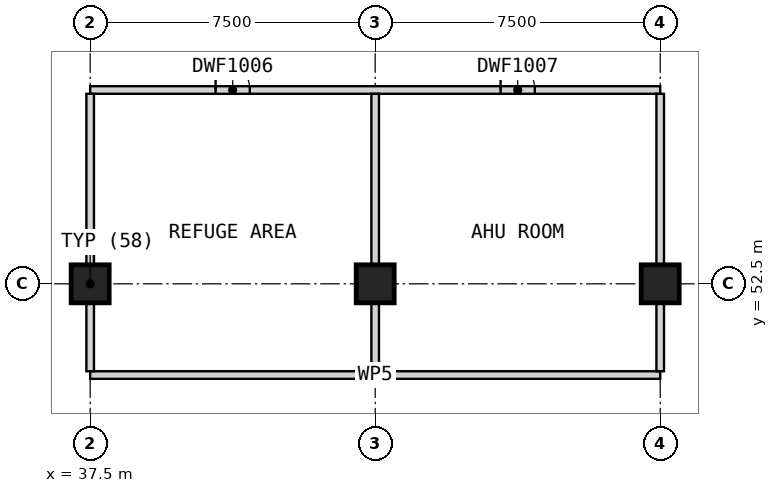
"""IFC4 building model, lengths in metres.
Left out: names, types, materials, properties, quantities, classifications, styles, units other than length and angle.
Written with IfcOpenShell. Run it as: python <this file> out.ifc"""

import sys

from ifc_helpers import new_model, si_unit, direction, frame, frame_2d, origin, origin_2d, place, context, subcontext, project, spatial, rectangle, extrude, element, fill, save


model = new_model("IFC4")
c1 = context("Model", 3, precision=1e-05, world=origin(), true_north=direction((0.0, 1.0)))
c2 = subcontext(c1, "Body", "Model", "MODEL_VIEW")
j1 = project(units=[si_unit("LENGTHUNIT", "METRE"), si_unit("PLANEANGLEUNIT", "RADIAN")], contexts=[c1])
p1 = place(None, origin())
s1 = spatial("IfcSite", under=j1, at=p1, CompositionType="ELEMENT")
p2 = place(p1, origin())
s2 = spatial("IfcBuilding", under=s1, at=p2, CompositionType="ELEMENT")
p3 = place(p2, frame((0.0, 0.0, 166.2)))
s3 = spatial("IfcBuildingStorey", under=s2, at=p3, CompositionType="ELEMENT", Elevation=166.2)
for number, where, z_axis, x_axis in (
    (1, (37.5, 52.5, 0.0), (0.0, 0.0, 1.0), (1.0, 0.0, 0.0)),
    (2, (45.0, 52.5, 0.0), (0.0, 0.0, 1.0), (1.0, 0.0, 0.0)),
    (3, (52.5, 52.5, 0.0), (0.0, 0.0, 1.0), (1.0, 0.0, 0.0)),
):
    element("IfcColumn", number, at=place(p3, frame(where, z_axis=z_axis, x_axis=x_axis)), inside=s3, PredefinedType="COLUMN", context=c2, shape_type="SweptSolid", body=[
        extrude(rectangle(XDim=1.0, YDim=1.0, at=origin_2d()), origin(), (0.0, 0.0, 1.0), 8.0),
    ])
p4 = place(p3, frame((37.5, 50.1, 0.0), z_axis=(0.0, 0.0, 1.0), x_axis=(1.0, 0.0, 0.0)))
e4 = element("IfcWall", 4, at=p4, inside=s3, PredefinedType="PARTITIONING", context=c2, shape_type="SweptSolid", body=[
    extrude(rectangle(XDim=15.0, YDim=0.2, at=frame_2d((7.5, 0.0))), origin(), (0.0, 0.0, 1.0), 7.7),
])
p5 = place(p3, frame((37.5, 57.6, 0.0), z_axis=(0.0, 0.0, 1.0), x_axis=(1.0, 0.0, 0.0)))
e5 = element("IfcWall", 5, at=p5, inside=s3, PredefinedType="PARTITIONING", context=c2, shape_type="SweptSolid", body=[
    extrude(rectangle(XDim=15.0, YDim=0.2, at=frame_2d((7.5, 0.0))), origin(), (0.0, 0.0, 1.0), 7.7),
])
p6 = place(p5, frame((3.3, 0.0, 0.0)))
e6 = element("IfcOpeningElement", 6, at=p6, cuts=e5, PredefinedType="OPENING", context=c2, shape_type="SweptSolid", body=[
    extrude(rectangle(XDim=0.9, YDim=2.1, at=frame_2d((0.45, 1.05))), frame((0.0, 0.11, 0.0), z_axis=(0.0, -1.0, 0.0), x_axis=(1.0, 0.0, 0.0)), (0.0, 0.0, 1.0), 0.22),
])
p7 = place(p5, frame((10.8, 0.0, 0.0)))
e7 = element("IfcOpeningElement", 7, at=p7, cuts=e5, PredefinedType="OPENING", context=c2, shape_type="SweptSolid", body=[
    extrude(rectangle(XDim=0.9, YDim=2.1, at=frame_2d((0.45, 1.05))), frame((0.0, 0.11, 0.0), z_axis=(0.0, -1.0, 0.0), x_axis=(1.0, 0.0, 0.0)), (0.0, 0.0, 1.0), 0.22),
])
p8 = place(p3, frame((37.5, 50.2, 0.0), z_axis=(0.0, 0.0, 1.0), x_axis=(0.0, 1.0, 0.0)))
e8 = element("IfcWall", 8, at=p8, inside=s3, PredefinedType="PARTITIONING", context=c2, shape_type="SweptSolid", body=[
    extrude(rectangle(XDim=7.3, YDim=0.2, at=frame_2d((3.65, 0.0))), origin(), (0.0, 0.0, 1.0), 6.0),
])
for number, where, z_axis, x_axis in (
    (9, (45.0, 50.2, 0.0), (0.0, 0.0, 1.0), (0.0, 1.0, 0.0)),
    (10, (52.5, 50.2, 0.0), (0.0, 0.0, 1.0), (0.0, 1.0, 0.0)),
):
    element("IfcWall", number, at=place(p3, frame(where, z_axis=z_axis, x_axis=x_axis)), inside=s3, PredefinedType="PARTITIONING", context=c2, shape_type="SweptSolid", body=[
        extrude(rectangle(XDim=7.3, YDim=0.2, at=frame_2d((3.65, 0.0))), origin(), (0.0, 0.0, 1.0), 7.7),
    ])
p9 = place(p6, origin())
e11 = element("IfcDoor", 11, at=p9, inside=s3, OperationType="SINGLE_SWING_RIGHT", PredefinedType="DOOR", context=c2, shape_type="SweptSolid", body=[
    extrude(rectangle(XDim=0.9, YDim=2.1, at=frame_2d((0.45, 1.05))), frame((0.0, 0.025, 0.0), z_axis=(0.0, -1.0, 0.0), x_axis=(1.0, 0.0, 0.0)), (0.0, 0.0, 1.0), 0.05),
])
fill(e6, e11)
p10 = place(p7, origin())
e12 = element("IfcDoor", 12, at=p10, inside=s3, OperationType="SINGLE_SWING_RIGHT", PredefinedType="DOOR", context=c2, shape_type="SweptSolid", body=[
    extrude(rectangle(XDim=0.9, YDim=2.1, at=frame_2d((0.45, 1.05))), frame((0.0, 0.025, 0.0), z_axis=(0.0, -1.0, 0.0), x_axis=(1.0, 0.0, 0.0)), (0.0, 0.0, 1.0), 0.05),
])
fill(e7, e12)
save(model, sys.argv[1])
